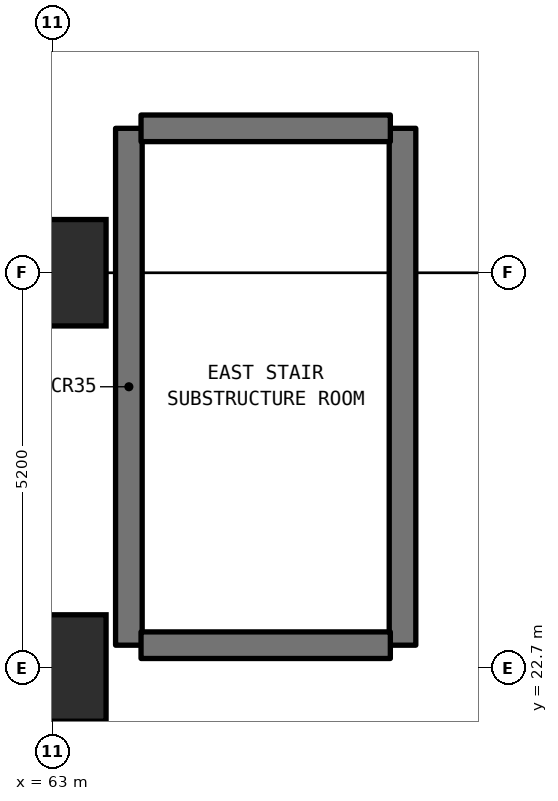
"""IFC4 building model, lengths in metres.
Left out: names, types, materials, properties, quantities, classifications, styles, units other than length and angle.
Written with IfcOpenShell. Run it as: python <this file> out.ifc"""

import sys

from ifc_helpers import new_model, si_unit, direction, frame, frame_2d, origin, origin_2d, place, context, subcontext, project, spatial, rectangle, extrude, element, save


model = new_model("IFC4")
c1 = context("Model", 3, precision=1e-05, world=origin(), true_north=direction((0.0, 1.0)))
c2 = subcontext(c1, "Body", "Model", "MODEL_VIEW")
j1 = project(units=[si_unit("LENGTHUNIT", "METRE"), si_unit("PLANEANGLEUNIT", "RADIAN")], contexts=[c1])
p1 = place(None, origin())
s1 = spatial("IfcSite", under=j1, at=p1, CompositionType="ELEMENT")
p2 = place(p1, origin())
s2 = spatial("IfcBuilding", under=s1, at=p2, CompositionType="ELEMENT")
p3 = place(p2, frame((0.0, 0.0, -9.0)))
s3 = spatial("IfcBuildingStorey", under=s2, at=p3, CompositionType="ELEMENT", Elevation=-9.0)
for number, where, z_axis, x_axis in (
    (1, (63.0, 22.7, 0.0), (0.0, 0.0, 1.0), (1.0, 0.0, 0.0)),
    (2, (63.0, 27.9, 0.0), (0.0, 0.0, 1.0), (1.0, 0.0, 0.0)),
):
    element("IfcColumn", number, at=place(p3, frame(where, z_axis=z_axis, x_axis=x_axis)), inside=s3, PredefinedType="PILASTER", context=c2, shape_type="SweptSolid", body=[
        extrude(rectangle(XDim=1.4, YDim=1.4, at=origin_2d()), origin(), (0.0, 0.0, 1.0), 4.5),
    ])
for number, where, z_axis, x_axis in (
    (3, (64.0, 23.0, 0.0), (0.0, 0.0, 1.0), (0.0, 1.0, 0.0)),
    (4, (67.6, 23.0, 0.0), (0.0, 0.0, 1.0), (0.0, 1.0, 0.0)),
):
    element("IfcWall", number, at=place(p3, frame(where, z_axis=z_axis, x_axis=x_axis)), inside=s3, PredefinedType="SHEAR", context=c2, shape_type="SweptSolid", body=[
        extrude(rectangle(XDim=6.8, YDim=0.35, at=frame_2d((3.4, 0.0))), origin(), (0.0, 0.0, 1.0), 4.16),
    ])
for number, where, z_axis, x_axis in (
    (5, (64.16, 23.0, 0.0), (0.0, 0.0, 1.0), (1.0, 0.0, 0.0)),
    (6, (64.16, 29.8, 0.0), (0.0, 0.0, 1.0), (1.0, 0.0, 0.0)),
):
    element("IfcWall", number, at=place(p3, frame(where, z_axis=z_axis, x_axis=x_axis)), inside=s3, PredefinedType="SHEAR", context=c2, shape_type="SweptSolid", body=[
        extrude(rectangle(XDim=3.28, YDim=0.35, at=frame_2d((1.64, 0.0))), origin(), (0.0, 0.0, 1.0), 4.16),
    ])
save(model, sys.argv[1])
